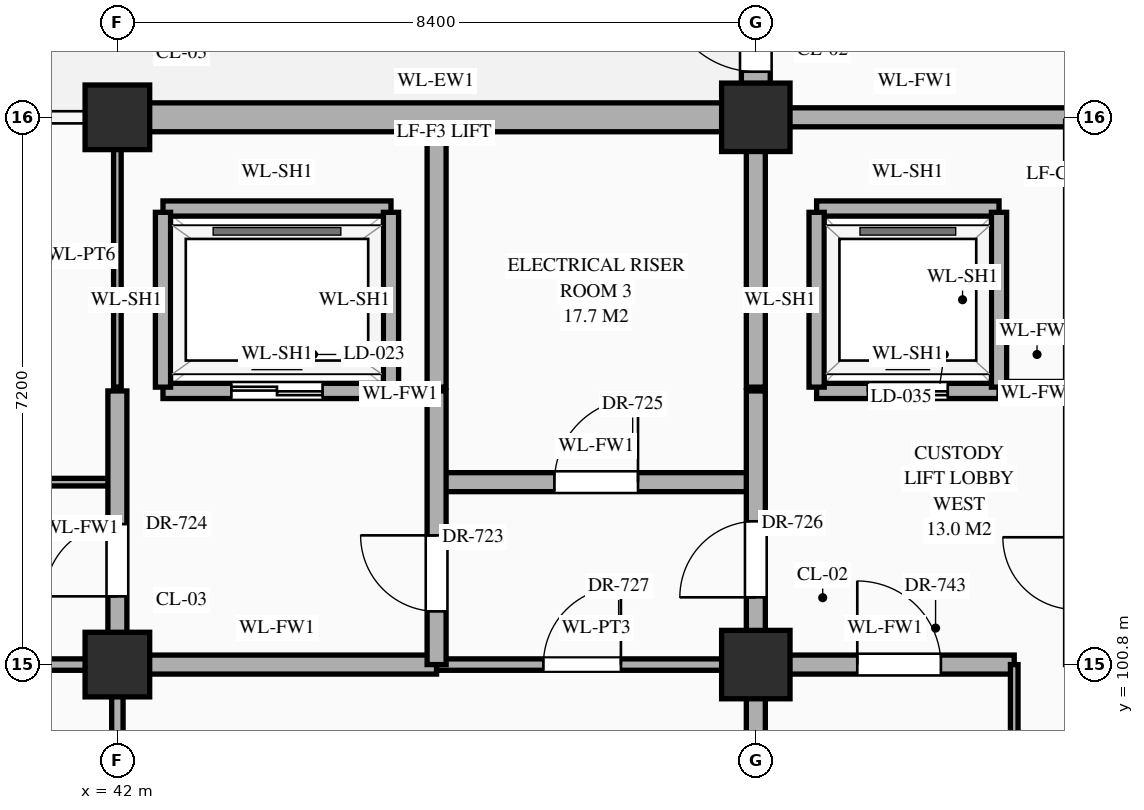
"""IFC4 building model, lengths in metres.
Left out: names, types, materials, properties, quantities, classifications, styles, units other than length and angle.
Written with IfcOpenShell. Run it as: python <this file> out.ifc"""

import sys

from ifc_helpers import new_model, si_unit, direction, frame, frame_2d, origin, origin_2d, place, context, subcontext, project, spatial, rectangle, extrude, element, fill, save


model = new_model("IFC4")
c1 = context("Model", 3, precision=1e-05, world=origin(), true_north=direction((0.0, 1.0)))
c2 = subcontext(c1, "Body", "Model", "MODEL_VIEW")
j1 = project(units=[si_unit("LENGTHUNIT", "METRE"), si_unit("PLANEANGLEUNIT", "RADIAN")], contexts=[c1])
p1 = place(None, origin())
s1 = spatial("IfcSite", under=j1, at=p1, CompositionType="ELEMENT")
p2 = place(p1, origin())
s2 = spatial("IfcBuilding", under=s1, at=p2, CompositionType="ELEMENT")
p3 = place(p2, origin())
s3 = spatial("IfcBuildingStorey", under=s2, at=p3, CompositionType="ELEMENT", Elevation=0.0)
for number, where, z_axis, x_axis in (
    (1, (42.0, 100.8, 0.0), (0.0, 0.0, 1.0), (1.0, 0.0, 0.0)),
    (2, (42.0, 108.0, 0.0), (0.0, 0.0, 1.0), (1.0, 0.0, 0.0)),
):
    element("IfcColumn", number, at=place(p3, frame(where, z_axis=z_axis, x_axis=x_axis)), inside=s3, PredefinedType="COLUMN", context=c2, shape_type="SweptSolid", body=[
        extrude(rectangle(XDim=0.85, YDim=0.85, at=origin_2d()), origin(), (0.0, 0.0, 1.0), 5.4),
    ])
for number, where, z_axis, x_axis in (
    (3, (50.4, 100.8, 0.0), (0.0, 0.0, 1.0), (1.0, 0.0, 0.0)),
    (4, (50.4, 108.0, 0.0), (0.0, 0.0, 1.0), (1.0, 0.0, 0.0)),
):
    element("IfcColumn", number, at=place(p3, frame(where, z_axis=z_axis, x_axis=x_axis)), inside=s3, PredefinedType="COLUMN", context=c2, shape_type="SweptSolid", body=[
        extrude(rectangle(XDim=0.9, YDim=0.9, at=origin_2d()), origin(), (0.0, 0.0, 1.0), 5.4),
    ])
p4 = place(p3, frame((42.42, 108.0, 0.0), z_axis=(0.0, 0.0, 1.0), x_axis=(1.0, 0.0, 0.0)))
e5 = element("IfcWall", 5, at=p4, inside=s3, PredefinedType="STANDARD", context=c2, shape_type="SweptSolid", body=[
    extrude(rectangle(XDim=7.535, YDim=0.38, at=frame_2d((3.768, 0.0))), origin(), (0.0, 0.0, 1.0), 4.47),
])
p5 = place(p3, frame((50.4, 108.445, 0.0), z_axis=(0.0, 0.0, 1.0), x_axis=(0.0, 1.0, 0.0)))
e6 = element("IfcWall", 6, at=p5, inside=s3, PredefinedType="STANDARD", context=c2, shape_type="SweptSolid", body=[
    extrude(rectangle(XDim=6.335, YDim=0.38, at=frame_2d((3.167, 0.0))), origin(), (0.0, 0.0, 1.0), 4.47),
])
p6 = place(p5, frame((0.155, 0.0, 0.0)))
e7 = element("IfcOpeningElement", 7, at=p6, cuts=e6, PredefinedType="OPENING", context=c2, shape_type="SweptSolid", body=[
    extrude(rectangle(XDim=1.2, YDim=2.2, at=frame_2d((0.6, 1.1))), frame((0.0, 0.202, 0.0), z_axis=(0.0, -1.0, 0.0), x_axis=(1.0, 0.0, 0.0)), (0.0, 0.0, 1.0), 0.404),
])
p7 = place(p5, frame((3.755, 0.0, 0.0)))
e8 = element("IfcOpeningElement", 8, at=p7, cuts=e6, PredefinedType="OPENING", context=c2, shape_type="SweptSolid", body=[
    extrude(rectangle(XDim=1.2, YDim=2.2, at=frame_2d((0.6, 1.1))), frame((0.0, 0.202, 0.0), z_axis=(0.0, -1.0, 0.0), x_axis=(1.0, 0.0, 0.0)), (0.0, 0.0, 1.0), 0.404),
])
p8 = place(p3, frame((31.0, 100.8, 0.0), z_axis=(0.0, 0.0, 1.0), x_axis=(1.0, 0.0, 0.0)))
e9 = element("IfcWall", 9, at=p8, inside=s3, PredefinedType="STANDARD", context=c2, shape_type="SweptSolid", body=[
    extrude(rectangle(XDim=11.0, YDim=0.15, at=frame_2d((5.5, 0.0))), origin(), (0.0, 0.0, 1.0), 4.27),
])
p9 = place(p8, frame((0.667, 0.0, 0.0)))
e10 = element("IfcOpeningElement", 10, at=p9, cuts=e9, PredefinedType="OPENING", context=c2, shape_type="SweptSolid", body=[
    extrude(rectangle(XDim=0.92, YDim=2.15, at=frame_2d((0.46, 1.075))), frame((0.0, 0.087, 0.0), z_axis=(0.0, -1.0, 0.0), x_axis=(1.0, 0.0, 0.0)), (0.0, 0.0, 1.0), 0.174),
])
p10 = place(p8, frame((6.32, 0.0, 0.0)))
e11 = element("IfcOpeningElement", 11, at=p10, cuts=e9, PredefinedType="OPENING", context=c2, shape_type="SweptSolid", body=[
    extrude(rectangle(XDim=0.96, YDim=2.2, at=frame_2d((0.48, 1.1))), frame((0.0, 0.087, 0.0), z_axis=(0.0, -1.0, 0.0), x_axis=(1.0, 0.0, 0.0)), (0.0, 0.0, 1.0), 0.174),
])
p11 = place(p3, frame((42.0, 100.8, 0.0), z_axis=(0.0, 0.0, 1.0), x_axis=(1.0, 0.0, 0.0)))
e12 = element("IfcWall", 12, at=p11, inside=s3, PredefinedType="STANDARD", context=c2, shape_type="SweptSolid", body=[
    extrude(rectangle(XDim=4.2, YDim=0.25, at=frame_2d((2.1, 0.0))), origin(), (0.0, 0.0, 1.0), 4.27),
])
p12 = place(p3, frame((46.2, 100.8, 0.0), z_axis=(0.0, 0.0, 1.0), x_axis=(1.0, 0.0, 0.0)))
e13 = element("IfcWall", 13, at=p12, inside=s3, PredefinedType="STANDARD", context=c2, shape_type="SweptSolid", body=[
    extrude(rectangle(XDim=4.2, YDim=0.15, at=frame_2d((2.1, 0.0))), origin(), (0.0, 0.0, 1.0), 4.27),
])
p13 = place(p12, frame((1.405, 0.0, 0.0)))
e14 = element("IfcOpeningElement", 14, at=p13, cuts=e13, PredefinedType="OPENING", context=c2, shape_type="SweptSolid", body=[
    extrude(rectangle(XDim=1.02, YDim=2.4, at=frame_2d((0.51, 1.2))), frame((0.0, 0.087, 0.0), z_axis=(0.0, -1.0, 0.0), x_axis=(1.0, 0.0, 0.0)), (0.0, 0.0, 1.0), 0.174),
])
p14 = place(p3, frame((50.4, 100.8, 0.0), z_axis=(0.0, 0.0, 1.0), x_axis=(1.0, 0.0, 0.0)))
e15 = element("IfcWall", 15, at=p14, inside=s3, PredefinedType="STANDARD", context=c2, shape_type="SweptSolid", body=[
    extrude(rectangle(XDim=3.4, YDim=0.25, at=frame_2d((1.7, 0.0))), origin(), (0.0, 0.0, 1.0), 4.27),
])
p15 = place(p14, frame((1.335, 0.0, 0.0)))
e16 = element("IfcOpeningElement", 16, at=p15, cuts=e15, PredefinedType="OPENING", context=c2, shape_type="SweptSolid", body=[
    extrude(rectangle(XDim=1.1, YDim=2.2, at=frame_2d((0.55, 1.1))), frame((0.0, 0.137, 0.0), z_axis=(0.0, -1.0, 0.0), x_axis=(1.0, 0.0, 0.0)), (0.0, 0.0, 1.0), 0.274),
])
p16 = place(p3, frame((16.8, 103.2, 0.0), z_axis=(0.0, 0.0, 1.0), x_axis=(1.0, 0.0, 0.0)))
e17 = element("IfcWall", 17, at=p16, inside=s3, PredefinedType="STANDARD", context=c2, shape_type="SweptSolid", body=[
    extrude(rectangle(XDim=25.2, YDim=0.1, at=frame_2d((12.6, 0.0))), origin(), (0.0, 0.0, 1.0), 5.12),
])
p17 = place(p16, frame((3.71, 0.0, 0.0)))
e18 = element("IfcOpeningElement", 18, at=p17, cuts=e17, PredefinedType="OPENING", context=c2, shape_type="SweptSolid", body=[
    extrude(rectangle(XDim=0.98, YDim=2.35, at=frame_2d((0.49, 1.175))), frame((0.0, 0.062, 0.0), z_axis=(0.0, -1.0, 0.0), x_axis=(1.0, 0.0, 0.0)), (0.0, 0.0, 1.0), 0.124),
])
p18 = place(p16, frame((12.09, 0.0, 0.0)))
e19 = element("IfcOpeningElement", 19, at=p18, cuts=e17, PredefinedType="OPENING", context=c2, shape_type="SweptSolid", body=[
    extrude(rectangle(XDim=1.02, YDim=2.4, at=frame_2d((0.51, 1.2))), frame((0.0, 0.062, 0.0), z_axis=(0.0, -1.0, 0.0), x_axis=(1.0, 0.0, 0.0)), (0.0, 0.0, 1.0), 0.124),
])
p19 = place(p16, frame((20.47, 0.0, 0.0)))
e20 = element("IfcOpeningElement", 20, at=p19, cuts=e17, PredefinedType="OPENING", context=c2, shape_type="SweptSolid", body=[
    extrude(rectangle(XDim=1.06, YDim=2.4, at=frame_2d((0.53, 1.2))), frame((0.0, 0.062, 0.0), z_axis=(0.0, -1.0, 0.0), x_axis=(1.0, 0.0, 0.0)), (0.0, 0.0, 1.0), 0.124),
])
p20 = place(p3, frame((46.2, 103.2, 0.0), z_axis=(0.0, 0.0, 1.0), x_axis=(1.0, 0.0, 0.0)))
e21 = element("IfcWall", 21, at=p20, inside=s3, PredefinedType="STANDARD", context=c2, shape_type="SweptSolid", body=[
    extrude(rectangle(XDim=4.2, YDim=0.25, at=frame_2d((2.1, 0.0))), origin(), (0.0, 0.0, 1.0), 5.12),
])
p21 = place(p20, frame((1.55, 0.0, 0.0)))
e22 = element("IfcOpeningElement", 22, at=p21, cuts=e21, PredefinedType="OPENING", context=c2, shape_type="SweptSolid", body=[
    extrude(rectangle(XDim=1.1, YDim=2.2, at=frame_2d((0.55, 1.1))), frame((0.0, 0.137, 0.0), z_axis=(0.0, -1.0, 0.0), x_axis=(1.0, 0.0, 0.0)), (0.0, 0.0, 1.0), 0.274),
])
p22 = place(p3, frame((42.6, 104.4, 0.0), z_axis=(0.0, 0.0, 1.0), x_axis=(1.0, 0.0, 0.0)))
e23 = element("IfcWall", 23, at=p22, inside=s3, PredefinedType="STANDARD", context=c2, shape_type="SweptSolid", body=[
    extrude(rectangle(XDim=3.0, YDim=0.2, at=frame_2d((1.5, 0.0))), origin(), (0.0, 0.0, 1.0), 5.12),
])
p23 = place(p22, frame((0.9, 0.0, 0.0)))
e24 = element("IfcOpeningElement", 24, at=p23, cuts=e23, PredefinedType="OPENING", context=c2, shape_type="SweptSolid", body=[
    extrude(rectangle(XDim=1.2, YDim=2.15, at=frame_2d((0.6, 1.075))), frame((0.0, 0.112, 0.0), z_axis=(0.0, -1.0, 0.0), x_axis=(1.0, 0.0, 0.0)), (0.0, 0.0, 1.0), 0.224),
])
p24 = place(p3, frame((51.2, 104.4, 0.0), z_axis=(0.0, 0.0, 1.0), x_axis=(1.0, 0.0, 0.0)))
e25 = element("IfcWall", 25, at=p24, inside=s3, PredefinedType="STANDARD", context=c2, shape_type="SweptSolid", body=[
    extrude(rectangle(XDim=2.4, YDim=0.2, at=frame_2d((1.2, 0.0))), origin(), (0.0, 0.0, 1.0), 5.12),
])
p25 = place(p24, frame((0.675, 0.0, 0.0)))
e26 = element("IfcOpeningElement", 26, at=p25, cuts=e25, PredefinedType="OPENING", context=c2, shape_type="SweptSolid", body=[
    extrude(rectangle(XDim=1.05, YDim=2.15, at=frame_2d((0.525, 1.075))), frame((0.0, 0.112, 0.0), z_axis=(0.0, -1.0, 0.0), x_axis=(1.0, 0.0, 0.0)), (0.0, 0.0, 1.0), 0.224),
])
p26 = place(p3, frame((53.65, 104.4, 0.0), z_axis=(0.0, 0.0, 1.0), x_axis=(1.0, 0.0, 0.0)))
e27 = element("IfcWall", 27, at=p26, inside=s3, PredefinedType="STANDARD", context=c2, shape_type="SweptSolid", body=[
    extrude(rectangle(XDim=0.9, YDim=0.25, at=frame_2d((0.45, 0.0))), origin(), (0.0, 0.0, 1.0), 5.12),
])
p27 = place(p3, frame((42.6, 106.8, 0.0), z_axis=(0.0, 0.0, 1.0), x_axis=(1.0, 0.0, 0.0)))
e28 = element("IfcWall", 28, at=p27, inside=s3, PredefinedType="STANDARD", context=c2, shape_type="SweptSolid", body=[
    extrude(rectangle(XDim=3.0, YDim=0.2, at=frame_2d((1.5, 0.0))), origin(), (0.0, 0.0, 1.0), 5.12),
])
p28 = place(p3, frame((51.2, 106.8, 0.0), z_axis=(0.0, 0.0, 1.0), x_axis=(1.0, 0.0, 0.0)))
e29 = element("IfcWall", 29, at=p28, inside=s3, PredefinedType="STANDARD", context=c2, shape_type="SweptSolid", body=[
    extrude(rectangle(XDim=2.4, YDim=0.2, at=frame_2d((1.2, 0.0))), origin(), (0.0, 0.0, 1.0), 5.12),
])
p29 = place(p3, frame((50.45, 108.0, 0.0), z_axis=(0.0, 0.0, 1.0), x_axis=(1.0, 0.0, 0.0)))
e30 = element("IfcWall", 30, at=p29, inside=s3, PredefinedType="STANDARD", context=c2, shape_type="SweptSolid", body=[
    extrude(rectangle(XDim=4.1, YDim=0.25, at=frame_2d((2.05, 0.0))), origin(), (0.0, 0.0, 1.0), 4.27),
])
p30 = place(p3, frame((42.0, 96.0, 0.0), z_axis=(0.0, 0.0, 1.0), x_axis=(0.0, 1.0, 0.0)))
e31 = element("IfcWall", 31, at=p30, inside=s3, PredefinedType="STANDARD", context=c2, shape_type="SweptSolid", body=[
    extrude(rectangle(XDim=4.8, YDim=0.15, at=frame_2d((2.4, 0.0))), origin(), (0.0, 0.0, 1.0), 4.37),
])
p31 = place(p3, frame((42.0, 100.8, 0.0), z_axis=(0.0, 0.0, 1.0), x_axis=(0.0, 1.0, 0.0)))
e32 = element("IfcWall", 32, at=p31, inside=s3, PredefinedType="STANDARD", context=c2, shape_type="SweptSolid", body=[
    extrude(rectangle(XDim=3.6, YDim=0.25, at=frame_2d((1.8, 0.0))), origin(), (0.0, 0.0, 1.0), 4.37),
])
p32 = place(p31, frame((0.897, 0.0, 0.0)))
e33 = element("IfcOpeningElement", 33, at=p32, cuts=e32, PredefinedType="OPENING", context=c2, shape_type="SweptSolid", body=[
    extrude(rectangle(XDim=0.95, YDim=2.15, at=frame_2d((0.475, 1.075))), frame((0.0, 0.137, 0.0), z_axis=(0.0, -1.0, 0.0), x_axis=(1.0, 0.0, 0.0)), (0.0, 0.0, 1.0), 0.274),
])
p33 = place(p3, frame((42.0, 104.45, 0.0), z_axis=(0.0, 0.0, 1.0), x_axis=(0.0, 1.0, 0.0)))
e34 = element("IfcWall", 34, at=p33, inside=s3, PredefinedType="STANDARD", context=c2, shape_type="SweptSolid", body=[
    extrude(rectangle(XDim=3.46, YDim=0.1, at=frame_2d((1.73, 0.0))), origin(), (0.0, 0.0, 1.0), 4.37),
])
for number, where, z_axis, x_axis in (
    (35, (42.6, 104.45, 0.0), (0.0, 0.0, 1.0), (0.0, 1.0, 0.0)),
    (36, (45.6, 104.45, 0.0), (0.0, 0.0, 1.0), (0.0, 1.0, 0.0)),
):
    element("IfcWall", number, at=place(p3, frame(where, z_axis=z_axis, x_axis=x_axis)), inside=s3, PredefinedType="STANDARD", context=c2, shape_type="SweptSolid", body=[
        extrude(rectangle(XDim=2.3, YDim=0.2, at=frame_2d((1.15, 0.0))), origin(), (0.0, 0.0, 1.0), 5.12),
    ])
p34 = place(p3, frame((46.2, 100.8, 0.0), z_axis=(0.0, 0.0, 1.0), x_axis=(0.0, 1.0, 0.0)))
e37 = element("IfcWall", 37, at=p34, inside=s3, PredefinedType="STANDARD", context=c2, shape_type="SweptSolid", body=[
    extrude(rectangle(XDim=3.6, YDim=0.25, at=frame_2d((1.8, 0.0))), origin(), (0.0, 0.0, 1.0), 4.72),
])
p35 = place(p34, frame((0.7, 0.0, 0.0)))
e38 = element("IfcOpeningElement", 38, at=p35, cuts=e37, PredefinedType="OPENING", context=c2, shape_type="SweptSolid", body=[
    extrude(rectangle(XDim=1.0, YDim=2.2, at=frame_2d((0.5, 1.1))), frame((0.0, 0.137, 0.0), z_axis=(0.0, -1.0, 0.0), x_axis=(1.0, 0.0, 0.0)), (0.0, 0.0, 1.0), 0.274),
])
p36 = place(p3, frame((46.2, 104.45, 0.0), z_axis=(0.0, 0.0, 1.0), x_axis=(0.0, 1.0, 0.0)))
e39 = element("IfcWall", 39, at=p36, inside=s3, PredefinedType="STANDARD", context=c2, shape_type="SweptSolid", body=[
    extrude(rectangle(XDim=3.46, YDim=0.25, at=frame_2d((1.73, 0.0))), origin(), (0.0, 0.0, 1.0), 4.72),
])
p37 = place(p3, frame((50.4, 91.2, 0.0), z_axis=(0.0, 0.0, 1.0), x_axis=(0.0, 1.0, 0.0)))
e40 = element("IfcWall", 40, at=p37, inside=s3, PredefinedType="STANDARD", context=c2, shape_type="SweptSolid", body=[
    extrude(rectangle(XDim=13.2, YDim=0.25, at=frame_2d((6.6, 0.0))), origin(), (0.0, 0.0, 1.0), 4.37),
])
p38 = place(p37, frame((0.54, 0.0, 0.0)))
e41 = element("IfcOpeningElement", 41, at=p38, cuts=e40, PredefinedType="OPENING", context=c2, shape_type="SweptSolid", body=[
    extrude(rectangle(XDim=0.95, YDim=2.15, at=frame_2d((0.475, 1.075))), frame((0.0, 0.137, 0.0), z_axis=(0.0, -1.0, 0.0), x_axis=(1.0, 0.0, 0.0)), (0.0, 0.0, 1.0), 0.274),
])
p39 = place(p37, frame((10.485, 0.0, 0.0)))
e42 = element("IfcOpeningElement", 42, at=p39, cuts=e40, PredefinedType="OPENING", context=c2, shape_type="SweptSolid", body=[
    extrude(rectangle(XDim=1.0, YDim=2.2, at=frame_2d((0.5, 1.1))), frame((0.0, 0.137, 0.0), z_axis=(0.0, -1.0, 0.0), x_axis=(1.0, 0.0, 0.0)), (0.0, 0.0, 1.0), 0.274),
])
p40 = place(p37, frame((3.31, 0.0, 0.0)))
e43 = element("IfcOpeningElement", 43, at=p40, cuts=e40, PredefinedType="OPENING", context=c2, shape_type="SweptSolid", body=[
    extrude(rectangle(XDim=0.95, YDim=2.15, at=frame_2d((0.475, 1.075))), frame((0.0, 0.137, 0.0), z_axis=(0.0, -1.0, 0.0), x_axis=(1.0, 0.0, 0.0)), (0.0, 0.0, 1.0), 0.274),
])
p41 = place(p3, frame((50.4, 104.45, 0.0), z_axis=(0.0, 0.0, 1.0), x_axis=(0.0, 1.0, 0.0)))
e44 = element("IfcWall", 44, at=p41, inside=s3, PredefinedType="STANDARD", context=c2, shape_type="SweptSolid", body=[
    extrude(rectangle(XDim=3.46, YDim=0.25, at=frame_2d((1.73, 0.0))), origin(), (0.0, 0.0, 1.0), 4.37),
])
for number, where, z_axis, x_axis in (
    (45, (51.2, 104.45, 0.0), (0.0, 0.0, 1.0), (0.0, 1.0, 0.0)),
    (46, (53.6, 104.45, 0.0), (0.0, 0.0, 1.0), (0.0, 1.0, 0.0)),
):
    element("IfcWall", number, at=place(p3, frame(where, z_axis=z_axis, x_axis=x_axis)), inside=s3, PredefinedType="STANDARD", context=c2, shape_type="SweptSolid", body=[
        extrude(rectangle(XDim=2.3, YDim=0.2, at=frame_2d((1.15, 0.0))), origin(), (0.0, 0.0, 1.0), 5.12),
    ])
p42 = place(p3, frame((53.8, 96.0, 0.0), z_axis=(0.0, 0.0, 1.0), x_axis=(0.0, 1.0, 0.0)))
e47 = element("IfcWall", 47, at=p42, inside=s3, PredefinedType="STANDARD", context=c2, shape_type="SweptSolid", body=[
    extrude(rectangle(XDim=4.8, YDim=0.1, at=frame_2d((2.4, 0.0))), origin(), (0.0, 0.0, 1.0), 5.12),
])
p43 = place(p42, frame((1.87, 0.0, 0.0)))
e48 = element("IfcOpeningElement", 48, at=p43, cuts=e47, PredefinedType="OPENING", context=c2, shape_type="SweptSolid", body=[
    extrude(rectangle(XDim=1.06, YDim=2.4, at=frame_2d((0.53, 1.2))), frame((0.0, 0.062, 0.0), z_axis=(0.0, -1.0, 0.0), x_axis=(1.0, 0.0, 0.0)), (0.0, 0.0, 1.0), 0.124),
])
p44 = place(p6, origin())
e49 = element("IfcDoor", 49, at=p44, inside=s3, OperationType="SINGLE_SWING_RIGHT", PredefinedType="DOOR", context=c2, shape_type="SweptSolid", body=[
    extrude(rectangle(XDim=1.2, YDim=2.2, at=frame_2d((0.6, 1.1))), frame((0.0, 0.025, 0.0), z_axis=(0.0, -1.0, 0.0), x_axis=(1.0, 0.0, 0.0)), (0.0, 0.0, 1.0), 0.05),
])
fill(e7, e49)
p45 = place(p23, origin())
e50 = element("IfcDoor", 50, at=p45, inside=s3, OperationType="DOUBLE_DOOR_SLIDING", PredefinedType="DOOR", context=c2, shape_type="SweptSolid", body=[
    extrude(rectangle(XDim=1.2, YDim=2.15, at=frame_2d((0.6, 1.075))), frame((0.0, 0.025, 0.0), z_axis=(0.0, -1.0, 0.0), x_axis=(1.0, 0.0, 0.0)), (0.0, 0.0, 1.0), 0.05),
])
fill(e24, e50)
p46 = place(p25, origin())
e51 = element("IfcDoor", 51, at=p46, inside=s3, OperationType="DOUBLE_DOOR_SLIDING", PredefinedType="DOOR", context=c2, shape_type="SweptSolid", body=[
    extrude(rectangle(XDim=1.05, YDim=2.15, at=frame_2d((0.525, 1.075))), frame((0.0, 0.025, 0.0), z_axis=(0.0, -1.0, 0.0), x_axis=(1.0, 0.0, 0.0)), (0.0, 0.0, 1.0), 0.05),
])
fill(e26, e51)
p47 = place(p35, origin())
e52 = element("IfcDoor", 52, at=p47, inside=s3, OperationType="SINGLE_SWING_RIGHT", PredefinedType="DOOR", context=c2, shape_type="SweptSolid", body=[
    extrude(rectangle(XDim=1.0, YDim=2.2, at=frame_2d((0.5, 1.1))), frame((0.0, 0.025, 0.0), z_axis=(0.0, -1.0, 0.0), x_axis=(1.0, 0.0, 0.0)), (0.0, 0.0, 1.0), 0.05),
])
fill(e38, e52)
p48 = place(p32, origin())
e53 = element("IfcDoor", 53, at=p48, inside=s3, OperationType="SINGLE_SWING_LEFT", PredefinedType="DOOR", context=c2, shape_type="SweptSolid", body=[
    extrude(rectangle(XDim=0.95, YDim=2.15, at=frame_2d((0.475, 1.075))), frame((0.0, 0.025, 0.0), z_axis=(0.0, -1.0, 0.0), x_axis=(1.0, 0.0, 0.0)), (0.0, 0.0, 1.0), 0.05),
])
fill(e33, e53)
p49 = place(p21, origin())
e54 = element("IfcDoor", 54, at=p49, inside=s3, OperationType="SINGLE_SWING_RIGHT", PredefinedType="DOOR", context=c2, shape_type="SweptSolid", body=[
    extrude(rectangle(XDim=1.1, YDim=2.2, at=frame_2d((0.55, 1.1))), frame((0.0, 0.025, 0.0), z_axis=(0.0, -1.0, 0.0), x_axis=(1.0, 0.0, 0.0)), (0.0, 0.0, 1.0), 0.05),
])
fill(e22, e54)
p50 = place(p39, origin())
e55 = element("IfcDoor", 55, at=p50, inside=s3, OperationType="SINGLE_SWING_LEFT", PredefinedType="DOOR", context=c2, shape_type="SweptSolid", body=[
    extrude(rectangle(XDim=1.0, YDim=2.2, at=frame_2d((0.5, 1.1))), frame((0.0, 0.025, 0.0), z_axis=(0.0, -1.0, 0.0), x_axis=(1.0, 0.0, 0.0)), (0.0, 0.0, 1.0), 0.05),
])
fill(e42, e55)
p51 = place(p13, origin())
e56 = element("IfcDoor", 56, at=p51, inside=s3, OperationType="SINGLE_SWING_RIGHT", PredefinedType="DOOR", context=c2, shape_type="SweptSolid", body=[
    extrude(rectangle(XDim=1.02, YDim=2.4, at=frame_2d((0.51, 1.2))), frame((0.0, 0.025, 0.0), z_axis=(0.0, -1.0, 0.0), x_axis=(1.0, 0.0, 0.0)), (0.0, 0.0, 1.0), 0.05),
])
fill(e14, e56)
p52 = place(p15, origin())
e57 = element("IfcDoor", 57, at=p52, inside=s3, OperationType="SINGLE_SWING_LEFT", PredefinedType="DOOR", context=c2, shape_type="SweptSolid", body=[
    extrude(rectangle(XDim=1.1, YDim=2.2, at=frame_2d((0.55, 1.1))), frame((0.0, 0.025, 0.0), z_axis=(0.0, -1.0, 0.0), x_axis=(1.0, 0.0, 0.0)), (0.0, 0.0, 1.0), 0.05),
])
fill(e16, e57)
save(model, sys.argv[1])
